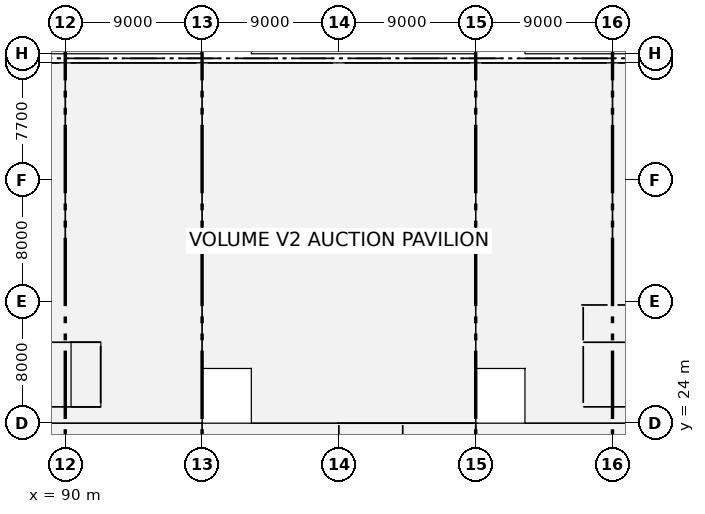
"""IFC4 building model, lengths in metres.
Left out: names, types, materials, properties, quantities, classifications, styles, units other than length and angle.
Written with IfcOpenShell. Run it as: python <this file> out.ifc"""

import sys

from ifc_helpers import new_model, si_unit, direction, frame, frame_2d, origin, origin_2d, place, context, subcontext, project, spatial, rectangle, extrude, element, fill, save


model = new_model("IFC4")
c1 = context("Model", 3, precision=1e-05, world=origin(), true_north=direction((0.0, 1.0)))
c2 = subcontext(c1, "Body", "Model", "MODEL_VIEW")
j1 = project(units=[si_unit("LENGTHUNIT", "METRE"), si_unit("PLANEANGLEUNIT", "RADIAN")], contexts=[c1])
p1 = place(None, origin())
s1 = spatial("IfcSite", under=j1, at=p1, CompositionType="ELEMENT")
p2 = place(p1, origin())
s2 = spatial("IfcBuilding", under=s1, at=p2, CompositionType="ELEMENT")
p3 = place(p2, origin())
s3 = spatial("IfcBuildingStorey", under=s2, at=p3, CompositionType="ELEMENT", Elevation=0.0)
for number, where, z_axis, x_axis in (
    (1, (90.0, 24.0, -0.5), (0.0, 0.0, 1.0), (1.0, 0.0, 0.0)),
    (2, (90.0, 32.0, -0.5), (0.0, 0.0, 1.0), (1.0, 0.0, 0.0)),
    (3, (90.0, 40.0, -0.5), (0.0, 0.0, 1.0), (1.0, 0.0, 0.0)),
):
    element("IfcColumn", number, at=place(p3, frame(where, z_axis=z_axis, x_axis=x_axis)), inside=s3, PredefinedType="COLUMN", context=c2, shape_type="SweptSolid", body=[
        extrude(rectangle(XDim=0.65, YDim=0.65, at=origin_2d()), origin(), (0.0, 0.0, 1.0), 6.8),
    ])
p4 = place(p3, frame((90.0, 47.7, -0.5), z_axis=(0.0, 0.0, 1.0), x_axis=(1.0, 0.0, 0.0)))
e4 = element("IfcColumn", 4, at=p4, inside=s3, PredefinedType="COLUMN", context=c2, shape_type="SweptSolid", body=[
    extrude(rectangle(XDim=0.75, YDim=0.55, at=origin_2d()), origin(), (0.0, 0.0, 1.0), 6.8),
])
p5 = place(p3, frame((90.0, 48.3, -0.5), z_axis=(0.0, 0.0, 1.0), x_axis=(1.0, 0.0, 0.0)))
e5 = element("IfcColumn", 5, at=p5, inside=s3, PredefinedType="COLUMN", context=c2, shape_type="SweptSolid", body=[
    extrude(rectangle(XDim=0.75, YDim=0.55, at=origin_2d()), origin(), (0.0, 0.0, 1.0), 7.3),
])
for number, where, z_axis, x_axis in (
    (6, (99.0, 24.0, -0.5), (0.0, 0.0, 1.0), (1.0, 0.0, 0.0)),
    (7, (99.0, 32.0, -0.5), (0.0, 0.0, 1.0), (1.0, 0.0, 0.0)),
    (8, (99.0, 40.0, -0.5), (0.0, 0.0, 1.0), (1.0, 0.0, 0.0)),
):
    element("IfcColumn", number, at=place(p3, frame(where, z_axis=z_axis, x_axis=x_axis)), inside=s3, PredefinedType="COLUMN", context=c2, shape_type="SweptSolid", body=[
        extrude(rectangle(XDim=0.65, YDim=0.65, at=origin_2d()), origin(), (0.0, 0.0, 1.0), 6.8),
    ])
p6 = place(p3, frame((99.0, 47.7, -0.5), z_axis=(0.0, 0.0, 1.0), x_axis=(1.0, 0.0, 0.0)))
e9 = element("IfcColumn", 9, at=p6, inside=s3, PredefinedType="COLUMN", context=c2, shape_type="SweptSolid", body=[
    extrude(rectangle(XDim=0.75, YDim=0.55, at=origin_2d()), origin(), (0.0, 0.0, 1.0), 6.8),
])
p7 = place(p3, frame((99.0, 48.3, -0.5), z_axis=(0.0, 0.0, 1.0), x_axis=(1.0, 0.0, 0.0)))
e10 = element("IfcColumn", 10, at=p7, inside=s3, PredefinedType="COLUMN", context=c2, shape_type="SweptSolid", body=[
    extrude(rectangle(XDim=0.75, YDim=0.55, at=origin_2d()), origin(), (0.0, 0.0, 1.0), 7.3),
])
p8 = place(p3, frame((108.0, 24.0, -0.5), z_axis=(0.0, 0.0, 1.0), x_axis=(1.0, 0.0, 0.0)))
e11 = element("IfcColumn", 11, at=p8, inside=s3, PredefinedType="COLUMN", context=c2, shape_type="SweptSolid", body=[
    extrude(rectangle(XDim=0.65, YDim=0.65, at=origin_2d()), origin(), (0.0, 0.0, 1.0), 6.8),
])
p9 = place(p3, frame((108.0, 47.7, -0.5), z_axis=(0.0, 0.0, 1.0), x_axis=(1.0, 0.0, 0.0)))
e12 = element("IfcColumn", 12, at=p9, inside=s3, PredefinedType="COLUMN", context=c2, shape_type="SweptSolid", body=[
    extrude(rectangle(XDim=0.75, YDim=0.55, at=origin_2d()), origin(), (0.0, 0.0, 1.0), 6.8),
])
p10 = place(p3, frame((108.0, 48.3, -0.5), z_axis=(0.0, 0.0, 1.0), x_axis=(1.0, 0.0, 0.0)))
e13 = element("IfcColumn", 13, at=p10, inside=s3, PredefinedType="COLUMN", context=c2, shape_type="SweptSolid", body=[
    extrude(rectangle(XDim=0.75, YDim=0.55, at=origin_2d()), origin(), (0.0, 0.0, 1.0), 7.3),
])
for number, where, z_axis, x_axis in (
    (14, (117.0, 24.0, -0.5), (0.0, 0.0, 1.0), (1.0, 0.0, 0.0)),
    (15, (117.0, 32.0, -0.5), (0.0, 0.0, 1.0), (1.0, 0.0, 0.0)),
    (16, (117.0, 40.0, -0.5), (0.0, 0.0, 1.0), (1.0, 0.0, 0.0)),
):
    element("IfcColumn", number, at=place(p3, frame(where, z_axis=z_axis, x_axis=x_axis)), inside=s3, PredefinedType="COLUMN", context=c2, shape_type="SweptSolid", body=[
        extrude(rectangle(XDim=0.65, YDim=0.65, at=origin_2d()), origin(), (0.0, 0.0, 1.0), 6.8),
    ])
p11 = place(p3, frame((117.0, 47.7, -0.5), z_axis=(0.0, 0.0, 1.0), x_axis=(1.0, 0.0, 0.0)))
e17 = element("IfcColumn", 17, at=p11, inside=s3, PredefinedType="COLUMN", context=c2, shape_type="SweptSolid", body=[
    extrude(rectangle(XDim=0.75, YDim=0.55, at=origin_2d()), origin(), (0.0, 0.0, 1.0), 6.8),
])
p12 = place(p3, frame((117.0, 48.3, -0.5), z_axis=(0.0, 0.0, 1.0), x_axis=(1.0, 0.0, 0.0)))
e18 = element("IfcColumn", 18, at=p12, inside=s3, PredefinedType="COLUMN", context=c2, shape_type="SweptSolid", body=[
    extrude(rectangle(XDim=0.75, YDim=0.55, at=origin_2d()), origin(), (0.0, 0.0, 1.0), 7.3),
])
for number, where, z_axis, x_axis in (
    (19, (126.0, 24.0, -0.5), (0.0, 0.0, 1.0), (1.0, 0.0, 0.0)),
    (20, (126.0, 32.0, -0.5), (0.0, 0.0, 1.0), (1.0, 0.0, 0.0)),
    (21, (126.0, 40.0, -0.5), (0.0, 0.0, 1.0), (1.0, 0.0, 0.0)),
):
    element("IfcColumn", number, at=place(p3, frame(where, z_axis=z_axis, x_axis=x_axis)), inside=s3, PredefinedType="COLUMN", context=c2, shape_type="SweptSolid", body=[
        extrude(rectangle(XDim=0.65, YDim=0.65, at=origin_2d()), origin(), (0.0, 0.0, 1.0), 6.8),
    ])
p13 = place(p3, frame((126.0, 47.7, -0.5), z_axis=(0.0, 0.0, 1.0), x_axis=(1.0, 0.0, 0.0)))
e22 = element("IfcColumn", 22, at=p13, inside=s3, PredefinedType="COLUMN", context=c2, shape_type="SweptSolid", body=[
    extrude(rectangle(XDim=0.75, YDim=0.55, at=origin_2d()), origin(), (0.0, 0.0, 1.0), 6.8),
])
p14 = place(p3, frame((126.0, 48.3, -0.5), z_axis=(0.0, 0.0, 1.0), x_axis=(1.0, 0.0, 0.0)))
e23 = element("IfcColumn", 23, at=p14, inside=s3, PredefinedType="COLUMN", context=c2, shape_type="SweptSolid", body=[
    extrude(rectangle(XDim=0.75, YDim=0.55, at=origin_2d()), origin(), (0.0, 0.0, 1.0), 7.3),
])
p15 = place(p3, frame((81.375, 47.7, 0.0), z_axis=(0.0, 0.0, 1.0), x_axis=(1.0, 0.0, 0.0)))
e24 = element("IfcWall", 24, at=p15, inside=s3, PredefinedType="SOLIDWALL", context=c2, shape_type="SweptSolid", body=[
    extrude(rectangle(XDim=8.25, YDim=0.34, at=frame_2d((4.125, 0.0))), origin(), (0.0, 0.0, 1.0), 5.1),
])
p16 = place(p15, frame((1.85, 0.0, 0.85)))
e25 = element("IfcOpeningElement", 25, at=p16, cuts=e24, PredefinedType="OPENING", context=c2, shape_type="SweptSolid", body=[
    extrude(rectangle(XDim=1.8, YDim=3.15, at=frame_2d((0.9, 1.575))), frame((0.0, 0.18, 0.0), z_axis=(0.0, -1.0, 0.0), x_axis=(1.0, 0.0, 0.0)), (0.0, 0.0, 1.0), 0.36),
])
p17 = place(p15, frame((4.6, 0.0, 0.85)))
e26 = element("IfcOpeningElement", 26, at=p17, cuts=e24, PredefinedType="OPENING", context=c2, shape_type="SweptSolid", body=[
    extrude(rectangle(XDim=1.8, YDim=3.15, at=frame_2d((0.9, 1.575))), frame((0.0, 0.18, 0.0), z_axis=(0.0, -1.0, 0.0), x_axis=(1.0, 0.0, 0.0)), (0.0, 0.0, 1.0), 0.36),
])
p18 = place(p3, frame((90.375, 47.7, 0.0), z_axis=(0.0, 0.0, 1.0), x_axis=(1.0, 0.0, 0.0)))
e27 = element("IfcWall", 27, at=p18, inside=s3, PredefinedType="SOLIDWALL", context=c2, shape_type="SweptSolid", body=[
    extrude(rectangle(XDim=8.25, YDim=0.34, at=frame_2d((4.125, 0.0))), origin(), (0.0, 0.0, 1.0), 5.1),
])
p19 = place(p18, frame((3.125, 0.0, 0.0)))
e28 = element("IfcOpeningElement", 28, at=p19, cuts=e27, PredefinedType="OPENING", context=c2, shape_type="SweptSolid", body=[
    extrude(rectangle(XDim=2.0, YDim=2.75, at=frame_2d((1.0, 1.375))), frame((0.0, 0.18, 0.0), z_axis=(0.0, -1.0, 0.0), x_axis=(1.0, 0.0, 0.0)), (0.0, 0.0, 1.0), 0.36),
])
p20 = place(p3, frame((99.375, 47.7, 0.0), z_axis=(0.0, 0.0, 1.0), x_axis=(1.0, 0.0, 0.0)))
e29 = element("IfcWall", 29, at=p20, inside=s3, PredefinedType="SOLIDWALL", context=c2, shape_type="SweptSolid", body=[
    extrude(rectangle(XDim=8.25, YDim=0.34, at=frame_2d((4.125, 0.0))), origin(), (0.0, 0.0, 1.0), 5.1),
])
p21 = place(p20, frame((1.85, 0.0, 0.85)))
e30 = element("IfcOpeningElement", 30, at=p21, cuts=e29, PredefinedType="OPENING", context=c2, shape_type="SweptSolid", body=[
    extrude(rectangle(XDim=1.8, YDim=3.15, at=frame_2d((0.9, 1.575))), frame((0.0, 0.18, 0.0), z_axis=(0.0, -1.0, 0.0), x_axis=(1.0, 0.0, 0.0)), (0.0, 0.0, 1.0), 0.36),
])
p22 = place(p20, frame((4.6, 0.0, 0.85)))
e31 = element("IfcOpeningElement", 31, at=p22, cuts=e29, PredefinedType="OPENING", context=c2, shape_type="SweptSolid", body=[
    extrude(rectangle(XDim=1.8, YDim=3.15, at=frame_2d((0.9, 1.575))), frame((0.0, 0.18, 0.0), z_axis=(0.0, -1.0, 0.0), x_axis=(1.0, 0.0, 0.0)), (0.0, 0.0, 1.0), 0.36),
])
p23 = place(p3, frame((108.375, 47.7, 0.0), z_axis=(0.0, 0.0, 1.0), x_axis=(1.0, 0.0, 0.0)))
e32 = element("IfcWall", 32, at=p23, inside=s3, PredefinedType="SOLIDWALL", context=c2, shape_type="SweptSolid", body=[
    extrude(rectangle(XDim=8.25, YDim=0.34, at=frame_2d((4.125, 0.0))), origin(), (0.0, 0.0, 1.0), 5.1),
])
p24 = place(p23, frame((3.125, 0.0, 0.0)))
e33 = element("IfcOpeningElement", 33, at=p24, cuts=e32, PredefinedType="OPENING", context=c2, shape_type="SweptSolid", body=[
    extrude(rectangle(XDim=2.0, YDim=2.75, at=frame_2d((1.0, 1.375))), frame((0.0, 0.18, 0.0), z_axis=(0.0, -1.0, 0.0), x_axis=(1.0, 0.0, 0.0)), (0.0, 0.0, 1.0), 0.36),
])
p25 = place(p3, frame((117.375, 47.7, 0.0), z_axis=(0.0, 0.0, 1.0), x_axis=(1.0, 0.0, 0.0)))
e34 = element("IfcWall", 34, at=p25, inside=s3, PredefinedType="SOLIDWALL", context=c2, shape_type="SweptSolid", body=[
    extrude(rectangle(XDim=8.25, YDim=0.34, at=frame_2d((4.125, 0.0))), origin(), (0.0, 0.0, 1.0), 5.1),
])
p26 = place(p25, frame((1.85, 0.0, 0.85)))
e35 = element("IfcOpeningElement", 35, at=p26, cuts=e34, PredefinedType="OPENING", context=c2, shape_type="SweptSolid", body=[
    extrude(rectangle(XDim=1.8, YDim=3.15, at=frame_2d((0.9, 1.575))), frame((0.0, 0.18, 0.0), z_axis=(0.0, -1.0, 0.0), x_axis=(1.0, 0.0, 0.0)), (0.0, 0.0, 1.0), 0.36),
])
p27 = place(p25, frame((4.6, 0.0, 0.85)))
e36 = element("IfcOpeningElement", 36, at=p27, cuts=e34, PredefinedType="OPENING", context=c2, shape_type="SweptSolid", body=[
    extrude(rectangle(XDim=1.8, YDim=3.15, at=frame_2d((0.9, 1.575))), frame((0.0, 0.18, 0.0), z_axis=(0.0, -1.0, 0.0), x_axis=(1.0, 0.0, 0.0)), (0.0, 0.0, 1.0), 0.36),
])
p28 = place(p3, frame((126.375, 47.7, 0.0), z_axis=(0.0, 0.0, 1.0), x_axis=(1.0, 0.0, 0.0)))
e37 = element("IfcWall", 37, at=p28, inside=s3, PredefinedType="SOLIDWALL", context=c2, shape_type="SweptSolid", body=[
    extrude(rectangle(XDim=8.25, YDim=0.34, at=frame_2d((4.125, 0.0))), origin(), (0.0, 0.0, 1.0), 5.1),
])
p29 = place(p28, frame((3.125, 0.0, 0.0)))
e38 = element("IfcOpeningElement", 38, at=p29, cuts=e37, PredefinedType="OPENING", context=c2, shape_type="SweptSolid", body=[
    extrude(rectangle(XDim=2.0, YDim=2.75, at=frame_2d((1.0, 1.375))), frame((0.0, 0.18, 0.0), z_axis=(0.0, -1.0, 0.0), x_axis=(1.0, 0.0, 0.0)), (0.0, 0.0, 1.0), 0.36),
])
p30 = place(p3, frame((107.875, 24.0, -0.5), z_axis=(0.0, 0.0, 1.0), x_axis=(1.0, 0.0, 0.0)))
e39 = element("IfcWall", 39, at=p30, inside=s3, PredefinedType="SOLIDWALL", context=c2, shape_type="SweptSolid", body=[
    extrude(rectangle(XDim=9.25, YDim=0.25, at=frame_2d((4.625, 0.0))), origin(), (0.0, 0.0, 1.0), 6.8),
])
p31 = place(p30, frame((5.775, 0.0, 0.5)))
e40 = element("IfcOpeningElement", 40, at=p31, cuts=e39, PredefinedType="OPENING", context=c2, shape_type="SweptSolid", body=[
    extrude(rectangle(XDim=1.6, YDim=2.2, at=frame_2d((0.8, 1.1))), frame((0.0, 0.135, 0.0), z_axis=(0.0, -1.0, 0.0), x_axis=(1.0, 0.0, 0.0)), (0.0, 0.0, 1.0), 0.27),
])
p32 = place(p3, frame((108.0, 16.125, -0.5), z_axis=(0.0, 0.0, 1.0), x_axis=(0.0, 1.0, 0.0)))
e41 = element("IfcWall", 41, at=p32, inside=s3, PredefinedType="SOLIDWALL", context=c2, shape_type="SweptSolid", body=[
    extrude(rectangle(XDim=7.75, YDim=0.25, at=frame_2d((3.875, 0.0))), origin(), (0.0, 0.0, 1.0), 6.8),
])
p33 = place(p32, frame((1.15, 0.0, 0.5)))
e42 = element("IfcOpeningElement", 42, at=p33, cuts=e41, PredefinedType="OPENING", context=c2, shape_type="SweptSolid", body=[
    extrude(rectangle(XDim=1.2, YDim=2.2, at=frame_2d((0.6, 1.1))), frame((0.0, 0.135, 0.0), z_axis=(0.0, -1.0, 0.0), x_axis=(1.0, 0.0, 0.0)), (0.0, 0.0, 1.0), 0.27),
])
p34 = place(p3, frame((117.0, 16.125, -0.5), z_axis=(0.0, 0.0, 1.0), x_axis=(0.0, 1.0, 0.0)))
e43 = element("IfcWall", 43, at=p34, inside=s3, PredefinedType="SOLIDWALL", context=c2, shape_type="SweptSolid", body=[
    extrude(rectangle(XDim=7.75, YDim=0.25, at=frame_2d((3.875, 0.0))), origin(), (0.0, 0.0, 1.0), 6.8),
])
p35 = place(p3, frame((112.2, 20.075, -0.5), z_axis=(0.0, 0.0, 1.0), x_axis=(0.0, 1.0, 0.0)))
e44 = element("IfcWall", 44, at=p35, inside=s3, PredefinedType="SOLIDWALL", context=c2, shape_type="SweptSolid", body=[
    extrude(rectangle(XDim=3.8, YDim=0.25, at=frame_2d((1.9, 0.0))), origin(), (0.0, 0.0, 1.0), 6.8),
])
p36 = place(p35, frame((1.35, 0.0, 0.5)))
e45 = element("IfcOpeningElement", 45, at=p36, cuts=e44, PredefinedType="OPENING", context=c2, shape_type="SweptSolid", body=[
    extrude(rectangle(XDim=1.1, YDim=2.2, at=frame_2d((0.55, 1.1))), frame((0.0, 0.135, 0.0), z_axis=(0.0, -1.0, 0.0), x_axis=(1.0, 0.0, 0.0)), (0.0, 0.0, 1.0), 0.27),
])
for number, where, z_axis, x_axis in (
    (46, (83.475, 25.075, -0.5), (0.0, 0.0, 1.0), (1.0, 0.0, 0.0)),
    (47, (83.475, 29.325, -0.5), (0.0, 0.0, 1.0), (1.0, 0.0, 0.0)),
):
    element("IfcWall", number, at=place(p3, frame(where, z_axis=z_axis, x_axis=x_axis)), inside=s3, PredefinedType="SOLIDWALL", context=c2, shape_type="SweptSolid", body=[
        extrude(rectangle(XDim=8.85, YDim=0.25, at=frame_2d((4.425, 0.0))), origin(), (0.0, 0.0, 1.0), 6.8),
    ])
p37 = place(p3, frame((92.325, 25.325, -0.5), z_axis=(0.0, 0.0, 1.0), x_axis=(0.0, 1.0, 0.0)))
e48 = element("IfcWall", 48, at=p37, inside=s3, PredefinedType="SOLIDWALL", context=c2, shape_type="SweptSolid", body=[
    extrude(rectangle(XDim=3.75, YDim=0.25, at=frame_2d((1.875, 0.0))), origin(), (0.0, 0.0, 1.0), 6.8),
])
p38 = place(p3, frame((124.075, 25.075, -0.5), z_axis=(0.0, 0.0, 1.0), x_axis=(1.0, 0.0, 0.0)))
e49 = element("IfcWall", 49, at=p38, inside=s3, PredefinedType="SOLIDWALL", context=c2, shape_type="SweptSolid", body=[
    extrude(rectangle(XDim=8.85, YDim=0.25, at=frame_2d((4.425, 0.0))), origin(), (0.0, 0.0, 1.0), 6.8),
])
p39 = place(p3, frame((124.075, 29.325, -0.5), z_axis=(0.0, 0.0, 1.0), x_axis=(1.0, 0.0, 0.0)))
e50 = element("IfcWall", 50, at=p39, inside=s3, PredefinedType="SOLIDWALL", context=c2, shape_type="SweptSolid", body=[
    extrude(rectangle(XDim=8.85, YDim=0.25, at=frame_2d((4.425, 0.0))), origin(), (0.0, 0.0, 1.0), 6.8),
])
p40 = place(p39, frame((0.375, 0.0, 0.5)))
e51 = element("IfcOpeningElement", 51, at=p40, cuts=e50, PredefinedType="OPENING", context=c2, shape_type="SweptSolid", body=[
    extrude(rectangle(XDim=1.2, YDim=2.2, at=frame_2d((0.6, 1.1))), frame((0.0, 0.135, 0.0), z_axis=(0.0, -1.0, 0.0), x_axis=(1.0, 0.0, 0.0)), (0.0, 0.0, 1.0), 0.27),
])
p41 = place(p3, frame((124.075, 25.325, -0.5), z_axis=(0.0, 0.0, 1.0), x_axis=(0.0, 1.0, 0.0)))
e52 = element("IfcWall", 52, at=p41, inside=s3, PredefinedType="SOLIDWALL", context=c2, shape_type="SweptSolid", body=[
    extrude(rectangle(XDim=3.75, YDim=0.25, at=frame_2d((1.875, 0.0))), origin(), (0.0, 0.0, 1.0), 6.8),
])
p42 = place(p41, frame((1.1, 0.0, 0.5)))
e53 = element("IfcOpeningElement", 53, at=p42, cuts=e52, PredefinedType="OPENING", context=c2, shape_type="SweptSolid", body=[
    extrude(rectangle(XDim=1.2, YDim=2.2, at=frame_2d((0.6, 1.1))), frame((0.0, 0.135, 0.0), z_axis=(0.0, -1.0, 0.0), x_axis=(1.0, 0.0, 0.0)), (0.0, 0.0, 1.0), 0.27),
])
p43 = place(p3, frame((99.0, 16.42, 0.0), z_axis=(0.0, 0.0, 1.0), x_axis=(0.0, 1.0, 0.0)))
e54 = element("IfcWall", 54, at=p43, inside=s3, PredefinedType="STANDARD", context=c2, shape_type="SweptSolid", body=[
    extrude(rectangle(XDim=7.16, YDim=0.255, at=frame_2d((3.58, 0.0))), origin(), (0.0, 0.0, 1.0), 5.35),
])
p44 = place(p43, frame((2.78, 0.0, 0.0)))
e55 = element("IfcOpeningElement", 55, at=p44, cuts=e54, PredefinedType="OPENING", context=c2, shape_type="SweptSolid", body=[
    extrude(rectangle(XDim=1.6, YDim=2.2, at=frame_2d((0.8, 1.1))), frame((0.0, 0.137, 0.0), z_axis=(0.0, -1.0, 0.0), x_axis=(1.0, 0.0, 0.0)), (0.0, 0.0, 1.0), 0.275),
])
p45 = place(p3, frame((90.0, 32.3, 0.0), z_axis=(0.0, 0.0, 1.0), x_axis=(0.0, 1.0, 0.0)))
e56 = element("IfcWall", 56, at=p45, inside=s3, PredefinedType="PARTITIONING", context=c2, shape_type="SweptSolid", body=[
    extrude(rectangle(XDim=14.95, YDim=0.11, at=frame_2d((7.475, 0.0))), origin(), (0.0, 0.0, 1.0), 5.35),
])
p46 = place(p45, frame((3.31, 0.0, 0.0)))
e57 = element("IfcOpeningElement", 57, at=p46, cuts=e56, PredefinedType="OPENING", context=c2, shape_type="SweptSolid", body=[
    extrude(rectangle(XDim=1.08, YDim=2.15, at=frame_2d((0.54, 1.075))), frame((0.0, 0.065, 0.0), z_axis=(0.0, -1.0, 0.0), x_axis=(1.0, 0.0, 0.0)), (0.0, 0.0, 1.0), 0.13),
])
p47 = place(p3, frame((126.0, 32.3, 0.0), z_axis=(0.0, 0.0, 1.0), x_axis=(0.0, 1.0, 0.0)))
e58 = element("IfcWall", 58, at=p47, inside=s3, PredefinedType="PARTITIONING", context=c2, shape_type="SweptSolid", body=[
    extrude(rectangle(XDim=14.95, YDim=0.1, at=frame_2d((7.475, 0.0))), origin(), (0.0, 0.0, 1.0), 5.35),
])
p48 = place(p47, frame((3.38, 0.0, 0.0)))
e59 = element("IfcOpeningElement", 59, at=p48, cuts=e58, PredefinedType="OPENING", context=c2, shape_type="SweptSolid", body=[
    extrude(rectangle(XDim=0.94, YDim=2.14, at=frame_2d((0.47, 1.07))), frame((0.0, 0.06, 0.0), z_axis=(0.0, -1.0, 0.0), x_axis=(1.0, 0.0, 0.0)), (0.0, 0.0, 1.0), 0.12),
])
p49 = place(p3, frame((124.073, 29.45, 0.0), z_axis=(0.0, 0.0, 1.0), x_axis=(0.0, 1.0, 0.0)))
e60 = element("IfcWall", 60, at=p49, inside=s3, PredefinedType="STANDARD", context=c2, shape_type="SweptSolid", body=[
    extrude(rectangle(XDim=2.2, YDim=0.255, at=frame_2d((1.1, 0.0))), origin(), (0.0, 0.0, 1.0), 5.95),
])
p50 = place(p3, frame((123.945, 31.778, 0.0), z_axis=(0.0, 0.0, 1.0), x_axis=(1.0, 0.0, 0.0)))
e61 = element("IfcWall", 61, at=p50, inside=s3, PredefinedType="STANDARD", context=c2, shape_type="SweptSolid", body=[
    extrude(rectangle(XDim=1.73, YDim=0.255, at=frame_2d((0.865, 0.0))), origin(), (0.0, 0.0, 1.0), 5.95),
])
p51 = place(p3, frame((126.325, 31.778, 0.0), z_axis=(0.0, 0.0, 1.0), x_axis=(1.0, 0.0, 0.0)))
e62 = element("IfcWall", 62, at=p51, inside=s3, PredefinedType="STANDARD", context=c2, shape_type="SweptSolid", body=[
    extrude(rectangle(XDim=8.35, YDim=0.255, at=frame_2d((4.175, 0.0))), origin(), (0.0, 0.0, 1.0), 5.95),
])
p52 = place(p19, origin())
e63 = element("IfcDoor", 63, at=p52, inside=s3, OperationType="DOUBLE_DOOR_SINGLE_SWING", PredefinedType="DOOR", context=c2, shape_type="SweptSolid", body=[
    extrude(rectangle(XDim=2.0, YDim=2.75, at=frame_2d((1.0, 1.375))), frame((0.0, 0.025, 0.0), z_axis=(0.0, -1.0, 0.0), x_axis=(1.0, 0.0, 0.0)), (0.0, 0.0, 1.0), 0.05),
])
fill(e28, e63)
p53 = place(p21, origin())
e64 = element("IfcWindow", 64, at=p53, inside=s3, PartitioningType="DOUBLE_PANEL_VERTICAL", PredefinedType="WINDOW", context=c2, shape_type="SweptSolid", body=[
    extrude(rectangle(XDim=1.8, YDim=3.15, at=frame_2d((0.9, 1.575))), frame((0.0, 0.03, 0.0), z_axis=(0.0, -1.0, 0.0), x_axis=(1.0, 0.0, 0.0)), (0.0, 0.0, 1.0), 0.06),
])
fill(e30, e64)
p54 = place(p22, origin())
e65 = element("IfcWindow", 65, at=p54, inside=s3, PartitioningType="DOUBLE_PANEL_VERTICAL", PredefinedType="WINDOW", context=c2, shape_type="SweptSolid", body=[
    extrude(rectangle(XDim=1.8, YDim=3.15, at=frame_2d((0.9, 1.575))), frame((0.0, 0.03, 0.0), z_axis=(0.0, -1.0, 0.0), x_axis=(1.0, 0.0, 0.0)), (0.0, 0.0, 1.0), 0.06),
])
fill(e31, e65)
p55 = place(p24, origin())
e66 = element("IfcDoor", 66, at=p55, inside=s3, OperationType="DOUBLE_DOOR_SINGLE_SWING", PredefinedType="DOOR", context=c2, shape_type="SweptSolid", body=[
    extrude(rectangle(XDim=2.0, YDim=2.75, at=frame_2d((1.0, 1.375))), frame((0.0, 0.025, 0.0), z_axis=(0.0, -1.0, 0.0), x_axis=(1.0, 0.0, 0.0)), (0.0, 0.0, 1.0), 0.05),
])
fill(e33, e66)
p56 = place(p26, origin())
e67 = element("IfcWindow", 67, at=p56, inside=s3, PartitioningType="DOUBLE_PANEL_VERTICAL", PredefinedType="WINDOW", context=c2, shape_type="SweptSolid", body=[
    extrude(rectangle(XDim=1.8, YDim=3.15, at=frame_2d((0.9, 1.575))), frame((0.0, 0.03, 0.0), z_axis=(0.0, -1.0, 0.0), x_axis=(1.0, 0.0, 0.0)), (0.0, 0.0, 1.0), 0.06),
])
fill(e35, e67)
p57 = place(p27, origin())
e68 = element("IfcWindow", 68, at=p57, inside=s3, PartitioningType="DOUBLE_PANEL_VERTICAL", PredefinedType="WINDOW", context=c2, shape_type="SweptSolid", body=[
    extrude(rectangle(XDim=1.8, YDim=3.15, at=frame_2d((0.9, 1.575))), frame((0.0, 0.03, 0.0), z_axis=(0.0, -1.0, 0.0), x_axis=(1.0, 0.0, 0.0)), (0.0, 0.0, 1.0), 0.06),
])
fill(e36, e68)
p58 = place(p31, origin())
e69 = element("IfcDoor", 69, at=p58, inside=s3, OperationType="SINGLE_SWING_RIGHT", PredefinedType="DOOR", context=c2, shape_type="SweptSolid", body=[
    extrude(rectangle(XDim=1.6, YDim=2.2, at=frame_2d((0.8, 1.1))), frame((0.0, 0.025, 0.0), z_axis=(0.0, -1.0, 0.0), x_axis=(1.0, 0.0, 0.0)), (0.0, 0.0, 1.0), 0.05),
])
fill(e40, e69)
p59 = place(p42, origin())
e70 = element("IfcDoor", 70, at=p59, inside=s3, OperationType="SINGLE_SWING_LEFT", PredefinedType="DOOR", context=c2, shape_type="SweptSolid", body=[
    extrude(rectangle(XDim=1.2, YDim=2.2, at=frame_2d((0.6, 1.1))), frame((0.0, 0.025, 0.0), z_axis=(0.0, -1.0, 0.0), x_axis=(1.0, 0.0, 0.0)), (0.0, 0.0, 1.0), 0.05),
])
fill(e53, e70)
p60 = place(p46, origin())
e71 = element("IfcDoor", 71, at=p60, inside=s3, OperationType="SINGLE_SWING_RIGHT", PredefinedType="DOOR", context=c2, shape_type="SweptSolid", body=[
    extrude(rectangle(XDim=1.08, YDim=2.15, at=frame_2d((0.54, 1.075))), frame((0.0, 0.025, 0.0), z_axis=(0.0, -1.0, 0.0), x_axis=(1.0, 0.0, 0.0)), (0.0, 0.0, 1.0), 0.05),
])
fill(e57, e71)
p61 = place(p48, origin())
e72 = element("IfcDoor", 72, at=p61, inside=s3, OperationType="SINGLE_SWING_LEFT", PredefinedType="DOOR", context=c2, shape_type="SweptSolid", body=[
    extrude(rectangle(XDim=0.94, YDim=2.14, at=frame_2d((0.47, 1.07))), frame((0.0, 0.025, 0.0), z_axis=(0.0, -1.0, 0.0), x_axis=(1.0, 0.0, 0.0)), (0.0, 0.0, 1.0), 0.05),
])
fill(e59, e72)
p62 = place(p40, origin())
e73 = element("IfcDoor", 73, at=p62, inside=s3, OperationType="SINGLE_SWING_RIGHT", PredefinedType="DOOR", context=c2, shape_type="SweptSolid", body=[
    extrude(rectangle(XDim=1.2, YDim=2.2, at=frame_2d((0.6, 1.1))), frame((0.0, 0.025, 0.0), z_axis=(0.0, -1.0, 0.0), x_axis=(1.0, 0.0, 0.0)), (0.0, 0.0, 1.0), 0.05),
])
fill(e51, e73)
save(model, sys.argv[1])
